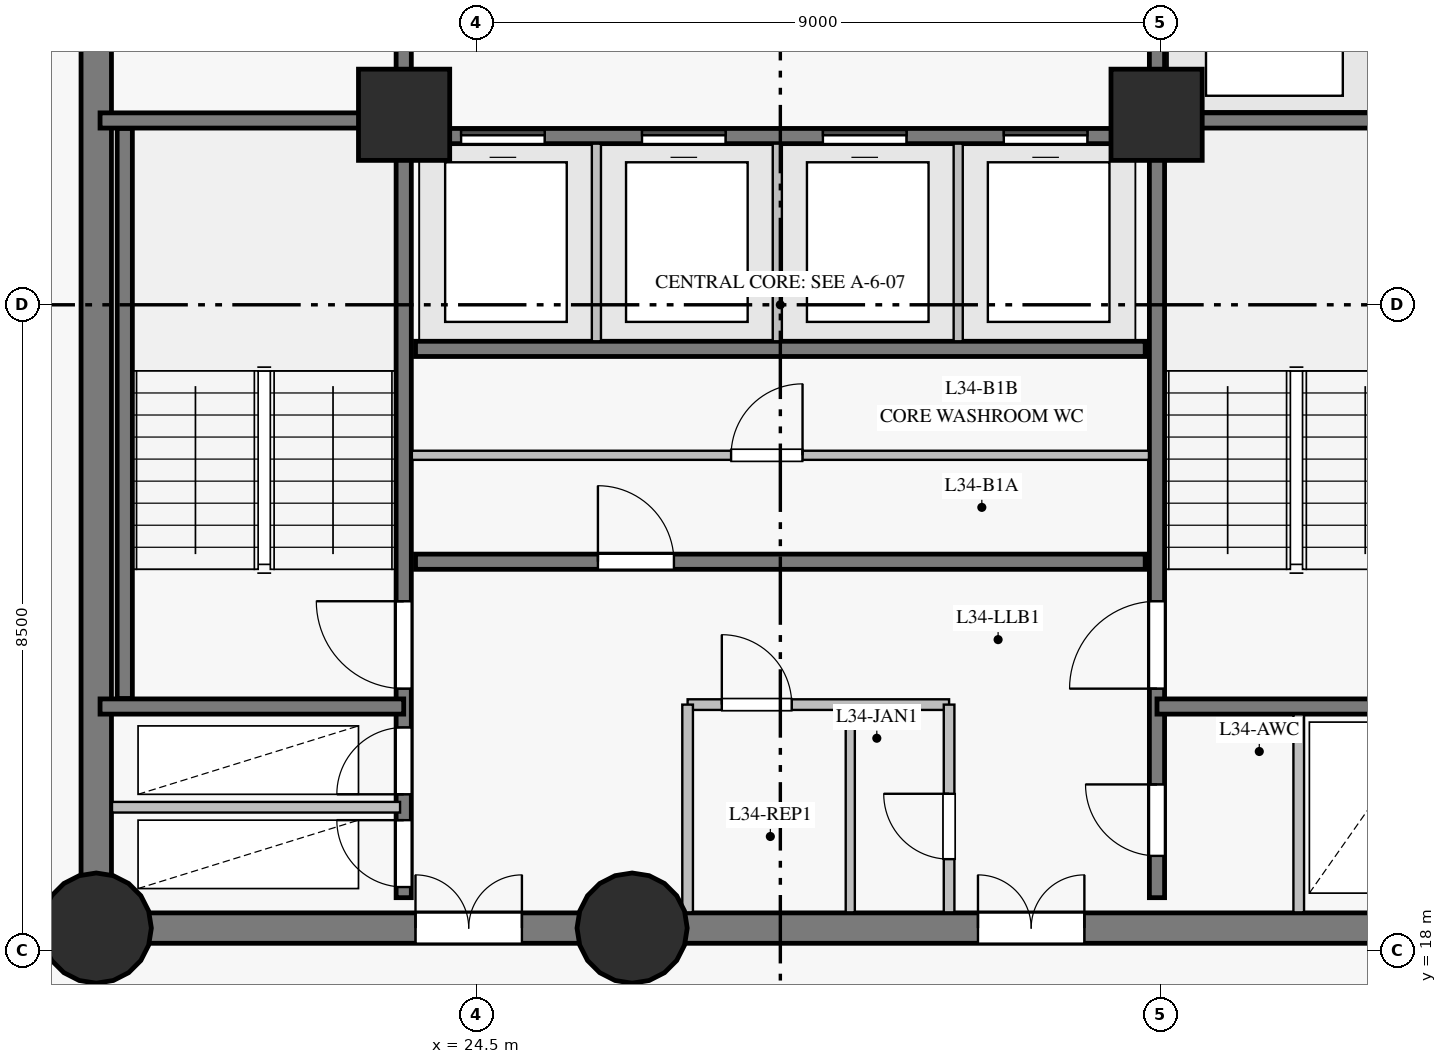
"""IFC4 building model, lengths in metres.
Left out: names, types, materials, properties, quantities, classifications, styles, units other than length and angle.
Written with IfcOpenShell. Run it as: python <this file> out.ifc"""

import sys

from ifc_helpers import new_model, si_unit, direction, frame, frame_2d, origin, origin_with_axes, origin_2d, place, context, subcontext, project, spatial, rectangle, circle, extrude, source, transform, mapped, element, fill, save


model = new_model("IFC4")
c1 = context("Model", 3, precision=1e-05, world=origin(), true_north=direction((0.0, 1.0)))
c2 = subcontext(c1, "Body", "Model", "MODEL_VIEW")
j1 = project(units=[si_unit("LENGTHUNIT", "METRE"), si_unit("PLANEANGLEUNIT", "RADIAN")], contexts=[c1])
p1 = place(None, origin())
s1 = spatial("IfcSite", under=j1, at=p1, CompositionType="ELEMENT")
p2 = place(p1, origin())
s2 = spatial("IfcBuilding", under=s1, at=p2, CompositionType="ELEMENT")
p3 = place(p2, frame((0.0, 0.0, 123.65)))
s3 = spatial("IfcBuildingStorey", under=s2, at=p3, CompositionType="ELEMENT", Elevation=123.65)
p4 = place(p3, frame((19.5, 18.3, 0.0), z_axis=(0.0, 0.0, 1.0), x_axis=(1.0, 0.0, 0.0)))
e1 = element("IfcWall", 1, at=p4, inside=s3, PredefinedType="SHEAR", context=c2, shape_type="SweptSolid", body=[
    extrude(rectangle(XDim=7.05, YDim=0.4, at=frame_2d((3.525, 0.0))), origin(), (0.0, 0.0, 1.0), 2.825),
])
p5 = place(p4, frame((4.2, 0.0, 0.0)))
e2 = element("IfcOpeningElement", 2, at=p5, cuts=e1, PredefinedType="OPENING", context=c2, shape_type="SweptSolid", body=[
    extrude(rectangle(XDim=1.4, YDim=2.2, at=frame_2d((0.7, 1.1))), frame((0.0, 0.21, 0.0), z_axis=(0.0, -1.0, 0.0), x_axis=(1.0, 0.0, 0.0)), (0.0, 0.0, 1.0), 0.42),
])
p6 = place(p3, frame((26.55, 18.3, 0.0), z_axis=(0.0, 0.0, 1.0), x_axis=(1.0, 0.0, 0.0)))
e3 = element("IfcWall", 3, at=p6, inside=s3, PredefinedType="SHEAR", context=c2, shape_type="SweptSolid", body=[
    extrude(rectangle(XDim=10.95, YDim=0.4, at=frame_2d((5.475, 0.0))), origin(), (0.0, 0.0, 1.0), 2.825),
])
p7 = place(p6, frame((4.55, 0.0, 0.0)))
e4 = element("IfcOpeningElement", 4, at=p7, cuts=e3, PredefinedType="OPENING", context=c2, shape_type="SweptSolid", body=[
    extrude(rectangle(XDim=1.4, YDim=2.2, at=frame_2d((0.7, 1.1))), frame((0.0, 0.21, 0.0), z_axis=(0.0, -1.0, 0.0), x_axis=(1.0, 0.0, 0.0)), (0.0, 0.0, 1.0), 0.42),
])
p8 = place(p3, frame((19.5, 34.7, 0.0), z_axis=(0.0, 0.0, 1.0), x_axis=(0.0, -1.0, 0.0)))
e5 = element("IfcWall", 5, at=p8, inside=s3, PredefinedType="SHEAR", context=c2, shape_type="SweptSolid", body=[
    extrude(rectangle(XDim=16.4, YDim=0.4, at=frame_2d((8.2, 0.0))), origin(), (0.0, 0.0, 1.0), 2.825),
])
p9 = place(p8, frame((3.1, 0.0, 0.0)))
e6 = element("IfcOpeningElement", 6, at=p9, cuts=e5, PredefinedType="OPENING", context=c2, shape_type="SweptSolid", body=[
    extrude(rectangle(XDim=1.1, YDim=2.15, at=frame_2d((0.55, 1.075))), frame((0.0, 0.21, 0.0), z_axis=(0.0, -1.0, 0.0), x_axis=(1.0, 0.0, 0.0)), (0.0, 0.0, 1.0), 0.42),
])
m1 = source(origin_with_axes(), c2, "Body", "SweptSolid", [
    extrude(circle(Radius=0.725, at=origin_2d()), origin(), (0.0, 0.0, 1.0), 3.05),
])
for number, where, z_axis, x_axis in (
    (7, (19.5, 18.3, 0.0), (0.0, 0.0, 1.0), (1.0, 0.0, 0.0)),
    (8, (26.55, 18.3, 0.0), (0.0, 0.0, 1.0), (1.0, 0.0, 0.0)),
):
    element("IfcColumn", number, at=place(p3, frame(where, z_axis=z_axis, x_axis=x_axis)), inside=s3, PredefinedType="COLUMN", context=c2, shape_type="MappedRepresentation", body=[
        mapped(m1, transform((0.0, 0.0, 0.0), scale=1.0)),
    ])
m2 = source(origin_with_axes(), c2, "Body", "SweptSolid", [
    extrude(rectangle(XDim=1.2, YDim=1.2, at=origin_2d()), origin(), (0.0, 0.0, 1.0), 3.05),
])
for number, where, z_axis, x_axis in (
    (9, (23.55, 29.0, 0.0), (0.0, 0.0, 1.0), (1.0, 0.0, 0.0)),
    (10, (33.45, 29.0, 0.0), (0.0, 0.0, 1.0), (1.0, 0.0, 0.0)),
):
    element("IfcColumn", number, at=place(p3, frame(where, z_axis=z_axis, x_axis=x_axis)), inside=s3, PredefinedType="COLUMN", context=c2, shape_type="MappedRepresentation", body=[
        mapped(m2, transform((0.0, 0.0, 0.0), scale=1.0)),
    ])
p10 = place(p3, frame((23.545, 18.7, 0.0), z_axis=(0.0, 0.0, 1.0), x_axis=(0.0, 1.0, 0.0)))
e11 = element("IfcWall", 11, at=p10, inside=s3, PredefinedType="SHEAR", context=c2, shape_type="SweptSolid", body=[
    extrude(rectangle(XDim=15.6, YDim=0.2, at=frame_2d((7.8, 0.0))), origin(), (0.0, 0.0, 1.0), 2.825),
])
p11 = place(p10, frame((2.75, 0.0, 0.0)))
e12 = element("IfcOpeningElement", 12, at=p11, cuts=e11, PredefinedType="OPENING", context=c2, shape_type="SweptSolid", body=[
    extrude(rectangle(XDim=1.15, YDim=2.15, at=frame_2d((0.575, 1.075))), frame((0.0, 0.11, 0.0), z_axis=(0.0, -1.0, 0.0), x_axis=(1.0, 0.0, 0.0)), (0.0, 0.0, 1.0), 0.22),
])
p12 = place(p10, frame((0.14, 0.0, 0.0)))
e13 = element("IfcOpeningElement", 13, at=p12, cuts=e11, PredefinedType="OPENING", context=c2, shape_type="SweptSolid", body=[
    extrude(rectangle(XDim=0.88, YDim=2.1, at=frame_2d((0.44, 1.05))), frame((0.0, 0.11, 0.0), z_axis=(0.0, -1.0, 0.0), x_axis=(1.0, 0.0, 0.0)), (0.0, 0.0, 1.0), 0.22),
])
p13 = place(p10, frame((1.36, 0.0, 0.0)))
e14 = element("IfcOpeningElement", 14, at=p13, cuts=e11, PredefinedType="OPENING", context=c2, shape_type="SweptSolid", body=[
    extrude(rectangle(XDim=0.88, YDim=2.1, at=frame_2d((0.44, 1.05))), frame((0.0, 0.11, 0.0), z_axis=(0.0, -1.0, 0.0), x_axis=(1.0, 0.0, 0.0)), (0.0, 0.0, 1.0), 0.22),
])
p14 = place(p10, frame((12.1, 0.0, 0.0)))
e15 = element("IfcOpeningElement", 15, at=p14, cuts=e11, PredefinedType="OPENING", context=c2, shape_type="SweptSolid", body=[
    extrude(rectangle(XDim=1.12, YDim=2.15, at=frame_2d((0.56, 1.075))), frame((0.0, 0.11, 0.0), z_axis=(0.0, -1.0, 0.0), x_axis=(1.0, 0.0, 0.0)), (0.0, 0.0, 1.0), 0.22),
])
p15 = place(p10, frame((14.05, 0.0, 0.0)))
e16 = element("IfcOpeningElement", 16, at=p15, cuts=e11, PredefinedType="OPENING", context=c2, shape_type="SweptSolid", body=[
    extrude(rectangle(XDim=1.12, YDim=2.15, at=frame_2d((0.56, 1.075))), frame((0.0, 0.11, 0.0), z_axis=(0.0, -1.0, 0.0), x_axis=(1.0, 0.0, 0.0)), (0.0, 0.0, 1.0), 0.22),
])
p16 = place(p3, frame((33.455, 18.7, 0.0), z_axis=(0.0, 0.0, 1.0), x_axis=(0.0, 1.0, 0.0)))
e17 = element("IfcWall", 17, at=p16, inside=s3, PredefinedType="SHEAR", context=c2, shape_type="SweptSolid", body=[
    extrude(rectangle(XDim=15.6, YDim=0.2, at=frame_2d((7.8, 0.0))), origin(), (0.0, 0.0, 1.0), 2.825),
])
p17 = place(p16, frame((2.75, 0.0, 0.0)))
e18 = element("IfcOpeningElement", 18, at=p17, cuts=e17, PredefinedType="OPENING", context=c2, shape_type="SweptSolid", body=[
    extrude(rectangle(XDim=1.15, YDim=2.15, at=frame_2d((0.575, 1.075))), frame((0.0, 0.11, 0.0), z_axis=(0.0, -1.0, 0.0), x_axis=(1.0, 0.0, 0.0)), (0.0, 0.0, 1.0), 0.22),
])
p18 = place(p16, frame((0.55, 0.0, 0.0)))
e19 = element("IfcOpeningElement", 19, at=p18, cuts=e17, PredefinedType="OPENING", context=c2, shape_type="SweptSolid", body=[
    extrude(rectangle(XDim=0.94, YDim=2.1, at=frame_2d((0.47, 1.05))), frame((0.0, 0.11, 0.0), z_axis=(0.0, -1.0, 0.0), x_axis=(1.0, 0.0, 0.0)), (0.0, 0.0, 1.0), 0.22),
])
p19 = place(p3, frame((23.7, 23.12, 0.0), z_axis=(0.0, 0.0, 1.0), x_axis=(1.0, 0.0, 0.0)))
e20 = element("IfcWall", 20, at=p19, inside=s3, PredefinedType="SHEAR", context=c2, shape_type="SweptSolid", body=[
    extrude(rectangle(XDim=9.6, YDim=0.2, at=frame_2d((4.8, 0.0))), origin(), (0.0, 0.0, 1.0), 2.825),
])
p20 = place(p19, frame((2.4, 0.0, 0.0)))
e21 = element("IfcOpeningElement", 21, at=p20, cuts=e20, PredefinedType="OPENING", context=c2, shape_type="SweptSolid", body=[
    extrude(rectangle(XDim=1.0, YDim=2.15, at=frame_2d((0.5, 1.075))), frame((0.0, 0.11, 0.0), z_axis=(0.0, -1.0, 0.0), x_axis=(1.0, 0.0, 0.0)), (0.0, 0.0, 1.0), 0.22),
])
p21 = place(p3, frame((23.7, 25.92, 0.0), z_axis=(0.0, 0.0, 1.0), x_axis=(1.0, 0.0, 0.0)))
e22 = element("IfcWall", 22, at=p21, inside=s3, PredefinedType="SHEAR", context=c2, shape_type="SweptSolid", body=[
    extrude(rectangle(XDim=9.6, YDim=0.2, at=frame_2d((4.8, 0.0))), origin(), (0.0, 0.0, 1.0), 2.825),
])
p22 = place(p3, frame((23.7, 28.72, 0.0), z_axis=(0.0, 0.0, 1.0), x_axis=(1.0, 0.0, 0.0)))
e23 = element("IfcWall", 23, at=p22, inside=s3, PredefinedType="SHEAR", context=c2, shape_type="SweptSolid", body=[
    extrude(rectangle(XDim=9.6, YDim=0.2, at=frame_2d((4.8, 0.0))), origin(), (0.0, 0.0, 1.0), 2.825),
])
p23 = place(p22, frame((0.6, 0.0, 0.0)))
e24 = element("IfcOpeningElement", 24, at=p23, cuts=e23, PredefinedType="OPENING", context=c2, shape_type="SweptSolid", body=[
    extrude(rectangle(XDim=1.1, YDim=2.15, at=frame_2d((0.55, 1.075))), frame((0.0, 0.11, 0.0), z_axis=(0.0, -1.0, 0.0), x_axis=(1.0, 0.0, 0.0)), (0.0, 0.0, 1.0), 0.22),
])
p24 = place(p22, frame((2.98, 0.0, 0.0)))
e25 = element("IfcOpeningElement", 25, at=p24, cuts=e23, PredefinedType="OPENING", context=c2, shape_type="SweptSolid", body=[
    extrude(rectangle(XDim=1.1, YDim=2.15, at=frame_2d((0.55, 1.075))), frame((0.0, 0.11, 0.0), z_axis=(0.0, -1.0, 0.0), x_axis=(1.0, 0.0, 0.0)), (0.0, 0.0, 1.0), 0.22),
])
p25 = place(p22, frame((5.36, 0.0, 0.0)))
e26 = element("IfcOpeningElement", 26, at=p25, cuts=e23, PredefinedType="OPENING", context=c2, shape_type="SweptSolid", body=[
    extrude(rectangle(XDim=1.1, YDim=2.15, at=frame_2d((0.55, 1.075))), frame((0.0, 0.11, 0.0), z_axis=(0.0, -1.0, 0.0), x_axis=(1.0, 0.0, 0.0)), (0.0, 0.0, 1.0), 0.22),
])
p26 = place(p22, frame((7.74, 0.0, 0.0)))
e27 = element("IfcOpeningElement", 27, at=p26, cuts=e23, PredefinedType="OPENING", context=c2, shape_type="SweptSolid", body=[
    extrude(rectangle(XDim=1.1, YDim=2.15, at=frame_2d((0.55, 1.075))), frame((0.0, 0.11, 0.0), z_axis=(0.0, -1.0, 0.0), x_axis=(1.0, 0.0, 0.0)), (0.0, 0.0, 1.0), 0.22),
])
p27 = place(p3, frame((19.875, 21.32, 0.0), z_axis=(0.0, 0.0, 1.0), x_axis=(0.0, 1.0, 0.0)))
e28 = element("IfcWall", 28, at=p27, inside=s3, PredefinedType="SHEAR", context=c2, shape_type="SweptSolid", body=[
    extrude(rectangle(XDim=7.5, YDim=0.2, at=frame_2d((3.75, 0.0))), origin(), (0.0, 0.0, 1.0), 2.825),
])
for number, where, z_axis, x_axis in (
    (29, (33.455, 21.215, 0.0), (0.0, 0.0, 1.0), (1.0, 0.0, 0.0)),
    (30, (33.455, 28.925, 0.0), (0.0, 0.0, 1.0), (1.0, 0.0, 0.0)),
    (31, (19.55, 21.215, 0.0), (0.0, 0.0, 1.0), (1.0, 0.0, 0.0)),
    (32, (19.55, 28.925, 0.0), (0.0, 0.0, 1.0), (1.0, 0.0, 0.0)),
):
    element("IfcWall", number, at=place(p3, frame(where, z_axis=z_axis, x_axis=x_axis)), inside=s3, PredefinedType="SHEAR", context=c2, shape_type="SweptSolid", body=[
        extrude(rectangle(XDim=3.995, YDim=0.2, at=frame_2d((1.998, 0.0))), origin(), (0.0, 0.0, 1.0), 2.825),
    ])
p28 = place(p3, frame((23.652, 24.52, 0.0), z_axis=(0.0, 0.0, 1.0), x_axis=(1.0, 0.0, 0.0)))
e33 = element("IfcWall", 33, at=p28, inside=s3, PredefinedType="PARTITIONING", context=c2, shape_type="SweptSolid", body=[
    extrude(rectangle(XDim=9.698, YDim=0.12, at=frame_2d((4.849, 0.0))), origin(), (0.0, 0.0, 1.0), 2.825),
])
p29 = place(p28, frame((4.2, 0.0, 0.0)))
e34 = element("IfcOpeningElement", 34, at=p29, cuts=e33, PredefinedType="OPENING", context=c2, shape_type="SweptSolid", body=[
    extrude(rectangle(XDim=0.94, YDim=2.1, at=frame_2d((0.47, 1.05))), frame((0.0, 0.07, 0.0), z_axis=(0.0, -1.0, 0.0), x_axis=(1.0, 0.0, 0.0)), (0.0, 0.0, 1.0), 0.14),
])
p30 = place(p3, frame((19.707, 19.89, 0.0), z_axis=(0.0, 0.0, 1.0), x_axis=(1.0, 0.0, 0.0)))
e35 = element("IfcWall", 35, at=p30, inside=s3, PredefinedType="PARTITIONING", context=c2, shape_type="SweptSolid", body=[
    extrude(rectangle(XDim=3.79, YDim=0.14, at=frame_2d((1.895, 0.0))), origin(), (0.0, 0.0, 1.0), 2.825),
])
p31 = place(p3, frame((27.28, 21.24, 0.0), z_axis=(0.0, 0.0, 1.0), x_axis=(1.0, 0.0, 0.0)))
e36 = element("IfcWall", 36, at=p31, inside=s3, PredefinedType="PARTITIONING", context=c2, shape_type="SweptSolid", body=[
    extrude(rectangle(XDim=3.44, YDim=0.14, at=frame_2d((1.72, 0.0))), origin(), (0.0, 0.0, 1.0), 2.825),
])
p32 = place(p31, frame((0.45, 0.0, 0.0)))
e37 = element("IfcOpeningElement", 37, at=p32, cuts=e36, PredefinedType="OPENING", context=c2, shape_type="SweptSolid", body=[
    extrude(rectangle(XDim=0.92, YDim=2.1, at=frame_2d((0.46, 1.05))), frame((0.0, 0.08, 0.0), z_axis=(0.0, -1.0, 0.0), x_axis=(1.0, 0.0, 0.0)), (0.0, 0.0, 1.0), 0.16),
])
p33 = place(p3, frame((27.28, 18.507, 0.0), z_axis=(0.0, 0.0, 1.0), x_axis=(0.0, 1.0, 0.0)))
e38 = element("IfcWall", 38, at=p33, inside=s3, PredefinedType="PARTITIONING", context=c2, shape_type="SweptSolid", body=[
    extrude(rectangle(XDim=2.733, YDim=0.14, at=frame_2d((1.366, 0.0))), origin(), (0.0, 0.0, 1.0), 2.825),
])
p34 = place(p3, frame((30.72, 18.507, 0.0), z_axis=(0.0, 0.0, 1.0), x_axis=(0.0, 1.0, 0.0)))
e39 = element("IfcWall", 39, at=p34, inside=s3, PredefinedType="PARTITIONING", context=c2, shape_type="SweptSolid", body=[
    extrude(rectangle(XDim=2.733, YDim=0.14, at=frame_2d((1.366, 0.0))), origin(), (0.0, 0.0, 1.0), 2.825),
])
p35 = place(p34, frame((0.7, 0.0, 0.0)))
e40 = element("IfcOpeningElement", 40, at=p35, cuts=e39, PredefinedType="OPENING", context=c2, shape_type="SweptSolid", body=[
    extrude(rectangle(XDim=0.86, YDim=2.1, at=frame_2d((0.43, 1.05))), frame((0.0, 0.08, 0.0), z_axis=(0.0, -1.0, 0.0), x_axis=(1.0, 0.0, 0.0)), (0.0, 0.0, 1.0), 0.16),
])
for number, where, z_axis, x_axis in (
    (41, (26.08, 26.02, 0.0), (0.0, 0.0, 1.0), (0.0, 1.0, 0.0)),
    (42, (28.46, 26.02, 0.0), (0.0, 0.0, 1.0), (0.0, 1.0, 0.0)),
    (43, (30.84, 26.02, 0.0), (0.0, 0.0, 1.0), (0.0, 1.0, 0.0)),
):
    element("IfcWall", number, at=place(p3, frame(where, z_axis=z_axis, x_axis=x_axis)), inside=s3, PredefinedType="PARTITIONING", context=c2, shape_type="SweptSolid", body=[
        extrude(rectangle(XDim=2.6, YDim=0.12, at=frame_2d((1.3, 0.0))), origin(), (0.0, 0.0, 1.0), 2.825),
    ])
p36 = place(p3, frame((29.42, 18.507, 0.0), z_axis=(0.0, 0.0, 1.0), x_axis=(0.0, 1.0, 0.0)))
e44 = element("IfcWall", 44, at=p36, inside=s3, PredefinedType="PARTITIONING", context=c2, shape_type="SweptSolid", body=[
    extrude(rectangle(XDim=2.662, YDim=0.12, at=frame_2d((1.331, 0.0))), origin(), (0.0, 0.0, 1.0), 2.825),
])
p37 = place(p3, frame((35.32, 18.507, 0.0), z_axis=(0.0, 0.0, 1.0), x_axis=(0.0, 1.0, 0.0)))
e45 = element("IfcWall", 45, at=p37, inside=s3, PredefinedType="PARTITIONING", context=c2, shape_type="SweptSolid", body=[
    extrude(rectangle(XDim=2.604, YDim=0.14, at=frame_2d((1.302, 0.0))), origin(), (0.0, 0.0, 1.0), 2.825),
])
m3 = source(origin_with_axes(), c2, "Body", "SweptSolid", [
    extrude(rectangle(XDim=1.15, YDim=2.15, at=frame_2d((0.575, 1.075))), frame((0.0, 0.025, 0.0), z_axis=(0.0, -1.0, 0.0), x_axis=(1.0, 0.0, 0.0)), (0.0, 0.0, 1.0), 0.05),
])
p38 = place(p11, origin())
e46 = element("IfcDoor", 46, at=p38, inside=s3, OperationType="SINGLE_SWING_RIGHT", PredefinedType="DOOR", context=c2, shape_type="MappedRepresentation", body=[
    mapped(m3, transform((0.0, 0.0, 0.0), scale=1.0)),
])
fill(e12, e46)
p39 = place(p17, origin())
e47 = element("IfcDoor", 47, at=p39, inside=s3, OperationType="SINGLE_SWING_LEFT", PredefinedType="DOOR", context=c2, shape_type="MappedRepresentation", body=[
    mapped(m3, transform((0.0, 0.0, 0.0), scale=1.0)),
])
fill(e18, e47)
m4 = source(origin_with_axes(), c2, "Body", "SweptSolid", [
    extrude(rectangle(XDim=0.88, YDim=2.1, at=frame_2d((0.44, 1.05))), frame((0.0, 0.025, 0.0), z_axis=(0.0, -1.0, 0.0), x_axis=(1.0, 0.0, 0.0)), (0.0, 0.0, 1.0), 0.05),
])
p40 = place(p12, origin())
e48 = element("IfcDoor", 48, at=p40, inside=s3, OperationType="SINGLE_SWING_RIGHT", PredefinedType="DOOR", context=c2, shape_type="MappedRepresentation", body=[
    mapped(m4, transform((0.0, 0.0, 0.0), scale=1.0)),
])
fill(e13, e48)
p41 = place(p13, origin())
e49 = element("IfcDoor", 49, at=p41, inside=s3, OperationType="SINGLE_SWING_LEFT", PredefinedType="DOOR", context=c2, shape_type="MappedRepresentation", body=[
    mapped(m4, transform((0.0, 0.0, 0.0), scale=1.0)),
])
fill(e14, e49)
m5 = source(origin_with_axes(), c2, "Body", "SweptSolid", [
    extrude(rectangle(XDim=1.4, YDim=2.2, at=frame_2d((0.7, 1.1))), frame((0.0, 0.025, 0.0), z_axis=(0.0, -1.0, 0.0), x_axis=(1.0, 0.0, 0.0)), (0.0, 0.0, 1.0), 0.05),
])
p42 = place(p5, origin())
e50 = element("IfcDoor", 50, at=p42, inside=s3, OperationType="DOUBLE_DOOR_SINGLE_SWING", PredefinedType="DOOR", context=c2, shape_type="MappedRepresentation", body=[
    mapped(m5, transform((0.0, 0.0, 0.0), scale=1.0)),
])
fill(e2, e50)
p43 = place(p7, origin())
e51 = element("IfcDoor", 51, at=p43, inside=s3, OperationType="DOUBLE_DOOR_SINGLE_SWING", PredefinedType="DOOR", context=c2, shape_type="MappedRepresentation", body=[
    mapped(m5, transform((0.0, 0.0, 0.0), scale=1.0)),
])
fill(e4, e51)
m6 = source(origin_with_axes(), c2, "Body", "SweptSolid", [
    extrude(rectangle(XDim=0.94, YDim=2.1, at=frame_2d((0.47, 1.05))), frame((0.0, 0.025, 0.0), z_axis=(0.0, -1.0, 0.0), x_axis=(1.0, 0.0, 0.0)), (0.0, 0.0, 1.0), 0.05),
])
p44 = place(p18, origin())
e52 = element("IfcDoor", 52, at=p44, inside=s3, OperationType="SINGLE_SWING_RIGHT", PredefinedType="DOOR", context=c2, shape_type="MappedRepresentation", body=[
    mapped(m6, transform((0.0, 0.0, 0.0), scale=1.0)),
])
fill(e19, e52)
m7 = source(origin_with_axes(), c2, "Body", "SweptSolid", [
    extrude(rectangle(XDim=0.92, YDim=2.1, at=frame_2d((0.46, 1.05))), frame((0.0, 0.025, 0.0), z_axis=(0.0, -1.0, 0.0), x_axis=(1.0, 0.0, 0.0)), (0.0, 0.0, 1.0), 0.05),
])
p45 = place(p32, origin())
e53 = element("IfcDoor", 53, at=p45, inside=s3, OperationType="SINGLE_SWING_LEFT", PredefinedType="DOOR", context=c2, shape_type="MappedRepresentation", body=[
    mapped(m7, transform((0.0, 0.0, 0.0), scale=1.0)),
])
fill(e37, e53)
m8 = source(origin_with_axes(), c2, "Body", "SweptSolid", [
    extrude(rectangle(XDim=0.86, YDim=2.1, at=frame_2d((0.43, 1.05))), frame((0.0, 0.025, 0.0), z_axis=(0.0, -1.0, 0.0), x_axis=(1.0, 0.0, 0.0)), (0.0, 0.0, 1.0), 0.05),
])
p46 = place(p35, origin())
e54 = element("IfcDoor", 54, at=p46, inside=s3, OperationType="SINGLE_SWING_RIGHT", PredefinedType="DOOR", context=c2, shape_type="MappedRepresentation", body=[
    mapped(m8, transform((0.0, 0.0, 0.0), scale=1.0)),
])
fill(e40, e54)
m9 = source(origin_with_axes(), c2, "Body", "SweptSolid", [
    extrude(rectangle(XDim=1.0, YDim=2.15, at=frame_2d((0.5, 1.075))), frame((0.0, 0.025, 0.0), z_axis=(0.0, -1.0, 0.0), x_axis=(1.0, 0.0, 0.0)), (0.0, 0.0, 1.0), 0.05),
])
p47 = place(p20, origin())
e55 = element("IfcDoor", 55, at=p47, inside=s3, OperationType="SINGLE_SWING_LEFT", PredefinedType="DOOR", context=c2, shape_type="MappedRepresentation", body=[
    mapped(m9, transform((0.0, 0.0, 0.0), scale=1.0)),
])
fill(e21, e55)
p48 = place(p29, origin())
e56 = element("IfcDoor", 56, at=p48, inside=s3, OperationType="SINGLE_SWING_RIGHT", PredefinedType="DOOR", context=c2, shape_type="MappedRepresentation", body=[
    mapped(m6, transform((0.0, 0.0, 0.0), scale=1.0)),
])
fill(e34, e56)
m10 = source(origin_with_axes(), c2, "Body", "SweptSolid", [
    extrude(rectangle(XDim=1.1, YDim=2.15, at=frame_2d((0.55, 1.075))), frame((0.0, 0.025, 0.0), z_axis=(0.0, -1.0, 0.0), x_axis=(1.0, 0.0, 0.0)), (0.0, 0.0, 1.0), 0.05),
])
p49 = place(p23, origin())
e57 = element("IfcDoor", 57, at=p49, inside=s3, OperationType="SLIDING_TO_LEFT", PredefinedType="DOOR", context=c2, shape_type="MappedRepresentation", body=[
    mapped(m10, transform((0.0, 0.0, 0.0), scale=1.0)),
])
fill(e24, e57)
p50 = place(p24, origin())
e58 = element("IfcDoor", 58, at=p50, inside=s3, OperationType="SLIDING_TO_RIGHT", PredefinedType="DOOR", context=c2, shape_type="MappedRepresentation", body=[
    mapped(m10, transform((0.0, 0.0, 0.0), scale=1.0)),
])
fill(e25, e58)
p51 = place(p25, origin())
e59 = element("IfcDoor", 59, at=p51, inside=s3, OperationType="SLIDING_TO_LEFT", PredefinedType="DOOR", context=c2, shape_type="MappedRepresentation", body=[
    mapped(m10, transform((0.0, 0.0, 0.0), scale=1.0)),
])
fill(e26, e59)
p52 = place(p26, origin())
e60 = element("IfcDoor", 60, at=p52, inside=s3, OperationType="SLIDING_TO_RIGHT", PredefinedType="DOOR", context=c2, shape_type="MappedRepresentation", body=[
    mapped(m10, transform((0.0, 0.0, 0.0), scale=1.0)),
])
fill(e27, e60)
save(model, sys.argv[1])
